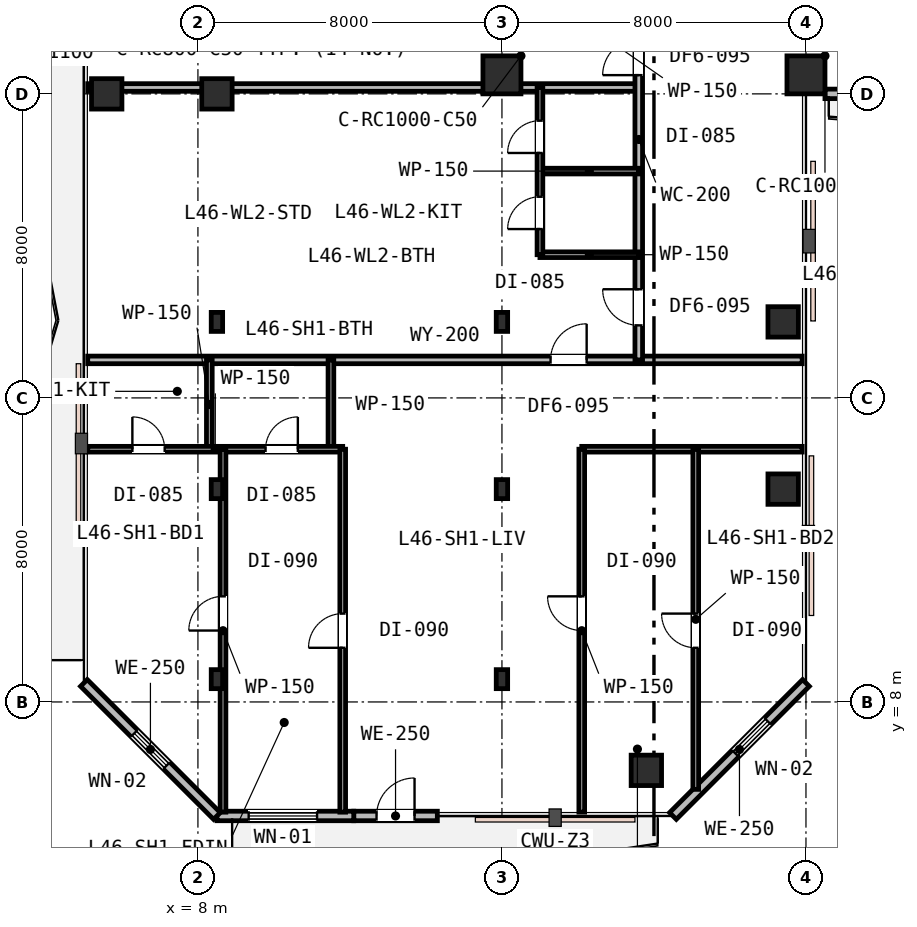
"""IFC4 building model, lengths in metres.
Left out: names, types, materials, properties, quantities, classifications, styles, units other than length and angle.
Written with IfcOpenShell. Run it as: python <this file> out.ifc"""

import sys

from ifc_helpers import new_model, si_unit, direction, frame, frame_2d, origin, origin_2d, place, context, subcontext, project, spatial, rectangle, i_section, extrude, element, fill, save


model = new_model("IFC4")
c1 = context("Model", 3, precision=1e-05, world=origin(), true_north=direction((0.0, 1.0)))
c2 = subcontext(c1, "Body", "Model", "MODEL_VIEW")
j1 = project(units=[si_unit("LENGTHUNIT", "METRE"), si_unit("PLANEANGLEUNIT", "RADIAN")], contexts=[c1])
p1 = place(None, origin())
s1 = spatial("IfcSite", under=j1, at=p1, CompositionType="ELEMENT")
p2 = place(p1, origin())
s2 = spatial("IfcBuilding", under=s1, at=p2, CompositionType="ELEMENT")
p3 = place(p2, frame((0.0, 0.0, 179.4)))
s3 = spatial("IfcBuildingStorey", under=s2, at=p3, CompositionType="ELEMENT", Elevation=179.4)
p4 = place(p3, frame((8.5, 24.0, 0.0), z_axis=(0.0, 0.0, 1.0), x_axis=(1.0, 0.0, 0.0)))
e1 = element("IfcColumn", 1, at=p4, inside=s3, PredefinedType="COLUMN", context=c2, shape_type="SweptSolid", body=[
    extrude(rectangle(XDim=0.8, YDim=0.8, at=origin_2d()), origin(), (0.0, 0.0, 1.0), 3.6),
])
for number, where, z_axis, x_axis in (
    (2, (16.0, 24.5, 0.0), (0.0, 0.0, 1.0), (1.0, 0.0, 0.0)),
    (3, (24.0, 24.5, 0.0), (0.0, 0.0, 1.0), (1.0, 0.0, 0.0)),
):
    element("IfcColumn", number, at=place(p3, frame(where, z_axis=z_axis, x_axis=x_axis)), inside=s3, PredefinedType="COLUMN", context=c2, shape_type="SweptSolid", body=[
        extrude(rectangle(XDim=1.0, YDim=1.0, at=origin_2d()), origin(), (0.0, 0.0, 1.0), 3.6),
    ])
for number, where, z_axis, x_axis in (
    (4, (5.6, 24.0, 0.0), (0.0, 0.0, 1.0), (1.0, 0.0, 0.0)),
    (5, (19.8, 6.2, 0.0), (0.0, 0.0, 1.0), (1.0, 0.0, 0.0)),
    (6, (23.4, 13.6, 0.0), (0.0, 0.0, 1.0), (1.0, 0.0, 0.0)),
    (7, (23.4, 18.0, 0.0), (0.0, 0.0, 1.0), (1.0, 0.0, 0.0)),
):
    element("IfcColumn", number, at=place(p3, frame(where, z_axis=z_axis, x_axis=x_axis)), inside=s3, PredefinedType="COLUMN", context=c2, shape_type="SweptSolid", body=[
        extrude(rectangle(XDim=0.8, YDim=0.8, at=origin_2d()), origin(), (0.0, 0.0, 1.0), 3.6),
    ])
for number, where, z_axis, x_axis in (
    (8, (8.5, 8.6, 0.0), (0.0, 0.0, 1.0), (1.0, 0.0, 0.0)),
    (9, (16.0, 8.6, 0.0), (0.0, 0.0, 1.0), (1.0, 0.0, 0.0)),
    (10, (8.5, 13.6, 0.0), (0.0, 0.0, 1.0), (1.0, 0.0, 0.0)),
    (11, (16.0, 13.6, 0.0), (0.0, 0.0, 1.0), (1.0, 0.0, 0.0)),
    (12, (8.5, 18.0, 0.0), (0.0, 0.0, 1.0), (1.0, 0.0, 0.0)),
    (13, (16.0, 18.0, 0.0), (0.0, 0.0, 1.0), (1.0, 0.0, 0.0)),
):
    element("IfcColumn", number, at=place(p3, frame(where, z_axis=z_axis, x_axis=x_axis)), inside=s3, PredefinedType="COLUMN", context=c2, shape_type="SweptSolid", body=[
        extrude(i_section(OverallWidth=0.3, OverallDepth=0.5, WebThickness=0.015, FlangeThickness=0.028, FilletRadius=0.027, at=origin_2d()), origin(), (0.0, 0.0, 1.0), 3.6),
    ])
p5 = place(p3, frame((12.1, 5.0, 0.0), z_axis=(0.0, 0.0, 1.0), x_axis=(1.0, 0.0, 0.0)))
e14 = element("IfcWall", 14, at=p5, inside=s3, PredefinedType="STANDARD", context=c2, shape_type="SweptSolid", body=[
    extrude(rectangle(XDim=2.2, YDim=0.25, at=frame_2d((1.1, 0.0))), origin(), (0.0, 0.0, 1.0), 3.33),
])
p6 = place(p5, frame((0.6, 0.0, 0.0)))
e15 = element("IfcOpeningElement", 15, at=p6, cuts=e14, PredefinedType="OPENING", context=c2, shape_type="SweptSolid", body=[
    extrude(rectangle(XDim=1.0, YDim=2.15, at=frame_2d((0.5, 1.075))), frame((0.0, 0.135, 0.0), z_axis=(0.0, -1.0, 0.0), x_axis=(1.0, 0.0, 0.0)), (0.0, 0.0, 1.0), 0.27),
])
p7 = place(p3, frame((8.5, 5.0, 0.0), z_axis=(0.0, 0.0, 1.0), x_axis=(1.0, 0.0, 0.0)))
e16 = element("IfcWall", 16, at=p7, inside=s3, PredefinedType="STANDARD", context=c2, shape_type="SweptSolid", body=[
    extrude(rectangle(XDim=3.6, YDim=0.25, at=frame_2d((1.8, 0.0))), origin(), (0.0, 0.0, 1.0), 3.33),
])
p8 = place(p7, frame((0.835, 0.0, 0.75)))
e17 = element("IfcOpeningElement", 17, at=p8, cuts=e16, PredefinedType="OPENING", context=c2, shape_type="SweptSolid", body=[
    extrude(rectangle(XDim=1.8, YDim=1.85, at=frame_2d((0.9, 0.925))), frame((0.0, 0.135, 0.0), z_axis=(0.0, -1.0, 0.0), x_axis=(1.0, 0.0, 0.0)), (0.0, 0.0, 1.0), 0.27),
])
p9 = place(p3, frame((20.5, 5.0, 0.0), z_axis=(0.0, 0.0, 1.0), x_axis=(0.707106781187, 0.707106781187, 0.0)))
e18 = element("IfcWall", 18, at=p9, inside=s3, PredefinedType="STANDARD", context=c2, shape_type="SweptSolid", body=[
    extrude(rectangle(XDim=4.95, YDim=0.25, at=frame_2d((2.475, 0.0))), origin(), (0.0, 0.0, 1.0), 3.33),
])
p10 = place(p9, frame((2.325, 0.0, 0.85)))
e19 = element("IfcOpeningElement", 19, at=p10, cuts=e18, PredefinedType="OPENING", context=c2, shape_type="SweptSolid", body=[
    extrude(rectangle(XDim=1.2, YDim=1.6, at=frame_2d((0.6, 0.8))), frame((0.0, 0.135, 0.0), z_axis=(0.0, -1.0, 0.0), x_axis=(1.0, 0.0, 0.0)), (0.0, 0.0, 1.0), 0.27),
])
p11 = place(p3, frame((24.5, 24.0, 0.0), z_axis=(0.0, 0.0, 1.0), x_axis=(1.0, 0.0, 0.0)))
e20 = element("IfcWall", 20, at=p11, inside=s3, PredefinedType="STANDARD", context=c2, shape_type="SweptSolid", body=[
    extrude(rectangle(XDim=1.35, YDim=0.25, at=frame_2d((0.675, 0.0))), origin(), (0.0, 0.0, 1.0), 3.02),
])
p12 = place(p3, frame((5.0, 8.5, 0.0), z_axis=(0.0, 0.0, 1.0), x_axis=(0.707106781187, -0.707106781187, 0.0)))
e21 = element("IfcWall", 21, at=p12, inside=s3, PredefinedType="STANDARD", context=c2, shape_type="SweptSolid", body=[
    extrude(rectangle(XDim=4.95, YDim=0.25, at=frame_2d((2.475, 0.0))), origin(), (0.0, 0.0, 1.0), 3.33),
])
p13 = place(p12, frame((1.875, 0.0, 0.85)))
e22 = element("IfcOpeningElement", 22, at=p13, cuts=e21, PredefinedType="OPENING", context=c2, shape_type="SweptSolid", body=[
    extrude(rectangle(XDim=1.2, YDim=1.6, at=frame_2d((0.6, 0.8))), frame((0.0, 0.135, 0.0), z_axis=(0.0, -1.0, 0.0), x_axis=(1.0, 0.0, 0.0)), (0.0, 0.0, 1.0), 0.27),
])
p14 = place(p3, frame((5.1, 17.0, 0.0), z_axis=(0.0, 0.0, 1.0), x_axis=(1.0, 0.0, 0.0)))
e23 = element("IfcWall", 23, at=p14, inside=s3, PredefinedType="PARTITIONING", context=c2, shape_type="SweptSolid", body=[
    extrude(rectangle(XDim=18.8, YDim=0.2, at=frame_2d((9.4, 0.0))), origin(), (0.0, 0.0, 1.0), 2.92),
])
p15 = place(p14, frame((12.179, 0.0, 0.0)))
e24 = element("IfcOpeningElement", 24, at=p15, cuts=e23, PredefinedType="OPENING", context=c2, shape_type="SweptSolid", body=[
    extrude(rectangle(XDim=0.95, YDim=2.15, at=frame_2d((0.475, 1.075))), frame((0.0, 0.11, 0.0), z_axis=(0.0, -1.0, 0.0), x_axis=(1.0, 0.0, 0.0)), (0.0, 0.0, 1.0), 0.22),
])
p16 = place(p3, frame((5.1, 24.168, 0.0), z_axis=(0.0, 0.0, 1.0), x_axis=(1.0, 0.0, 0.0)))
e25 = element("IfcWall", 25, at=p16, inside=s3, PredefinedType="PARTITIONING", context=c2, shape_type="SweptSolid", body=[
    extrude(rectangle(XDim=14.5, YDim=0.2, at=frame_2d((7.25, 0.0))), origin(), (0.0, 0.0, 1.0), 2.92),
])
p17 = place(p3, frame((19.6, 17.0, 0.0), z_axis=(0.0, 0.0, 1.0), x_axis=(0.0, 1.0, 0.0)))
e26 = element("IfcWall", 26, at=p17, inside=s3, PredefinedType="PARTITIONING", context=c2, shape_type="SweptSolid", body=[
    extrude(rectangle(XDim=11.6, YDim=0.2, at=frame_2d((5.8, 0.0))), origin(), (0.0, 0.0, 1.0), 2.92),
])
p18 = place(p17, frame((7.493, 0.0, 0.0)))
e27 = element("IfcOpeningElement", 27, at=p18, cuts=e26, PredefinedType="OPENING", context=c2, shape_type="SweptSolid", body=[
    extrude(rectangle(XDim=0.95, YDim=2.15, at=frame_2d((0.475, 1.075))), frame((0.0, 0.11, 0.0), z_axis=(0.0, -1.0, 0.0), x_axis=(1.0, 0.0, 0.0)), (0.0, 0.0, 1.0), 0.22),
])
p19 = place(p17, frame((0.909, 0.0, 0.0)))
e28 = element("IfcOpeningElement", 28, at=p19, cuts=e26, PredefinedType="OPENING", context=c2, shape_type="SweptSolid", body=[
    extrude(rectangle(XDim=0.95, YDim=2.15, at=frame_2d((0.475, 1.075))), frame((0.0, 0.11, 0.0), z_axis=(0.0, -1.0, 0.0), x_axis=(1.0, 0.0, 0.0)), (0.0, 0.0, 1.0), 0.22),
])
for number, where, z_axis, x_axis in (
    (29, (17.0, 19.768, 0.0), (0.0, 0.0, 1.0), (1.0, 0.0, 0.0)),
    (30, (17.0, 21.968, 0.0), (0.0, 0.0, 1.0), (1.0, 0.0, 0.0)),
):
    element("IfcWall", number, at=place(p3, frame(where, z_axis=z_axis, x_axis=x_axis)), inside=s3, PredefinedType="PARTITIONING", context=c2, shape_type="SweptSolid", body=[
        extrude(rectangle(XDim=2.6, YDim=0.15, at=frame_2d((1.3, 0.0))), origin(), (0.0, 0.0, 1.0), 3.33),
    ])
p20 = place(p3, frame((17.0, 19.768, 0.0), z_axis=(0.0, 0.0, 1.0), x_axis=(0.0, 1.0, 0.0)))
e31 = element("IfcWall", 31, at=p20, inside=s3, PredefinedType="PARTITIONING", context=c2, shape_type="SweptSolid", body=[
    extrude(rectangle(XDim=4.4, YDim=0.15, at=frame_2d((2.2, 0.0))), origin(), (0.0, 0.0, 1.0), 2.92),
])
p21 = place(p20, frame((0.675, 0.0, 0.0)))
e32 = element("IfcOpeningElement", 32, at=p21, cuts=e31, PredefinedType="OPENING", context=c2, shape_type="SweptSolid", body=[
    extrude(rectangle(XDim=0.85, YDim=2.15, at=frame_2d((0.425, 1.075))), frame((0.0, 0.085, 0.0), z_axis=(0.0, -1.0, 0.0), x_axis=(1.0, 0.0, 0.0)), (0.0, 0.0, 1.0), 0.17),
])
p22 = place(p20, frame((2.677, 0.0, 0.0)))
e33 = element("IfcOpeningElement", 33, at=p22, cuts=e31, PredefinedType="OPENING", context=c2, shape_type="SweptSolid", body=[
    extrude(rectangle(XDim=0.85, YDim=2.15, at=frame_2d((0.425, 1.075))), frame((0.0, 0.085, 0.0), z_axis=(0.0, -1.0, 0.0), x_axis=(1.0, 0.0, 0.0)), (0.0, 0.0, 1.0), 0.17),
])
p23 = place(p3, frame((11.5, 14.65, 0.0), z_axis=(0.0, 0.0, 1.0), x_axis=(0.0, 1.0, 0.0)))
e34 = element("IfcWall", 34, at=p23, inside=s3, PredefinedType="PARTITIONING", context=c2, shape_type="SweptSolid", body=[
    extrude(rectangle(XDim=2.35, YDim=0.15, at=frame_2d((1.175, 0.0))), origin(), (0.0, 0.0, 1.0), 3.07),
])
p24 = place(p3, frame((8.3, 14.65, 0.0), z_axis=(0.0, 0.0, 1.0), x_axis=(0.0, 1.0, 0.0)))
e35 = element("IfcWall", 35, at=p24, inside=s3, PredefinedType="PARTITIONING", context=c2, shape_type="SweptSolid", body=[
    extrude(rectangle(XDim=2.35, YDim=0.15, at=frame_2d((1.175, 0.0))), origin(), (0.0, 0.0, 1.0), 2.92),
])
p25 = place(p3, frame((5.1, 14.65, 0.0), z_axis=(0.0, 0.0, 1.0), x_axis=(1.0, 0.0, 0.0)))
e36 = element("IfcWall", 36, at=p25, inside=s3, PredefinedType="PARTITIONING", context=c2, shape_type="SweptSolid", body=[
    extrude(rectangle(XDim=6.71, YDim=0.15, at=frame_2d((3.355, 0.0))), origin(), (0.0, 0.0, 1.0), 2.92),
])
p26 = place(p25, frame((1.175, 0.0, 0.0)))
e37 = element("IfcOpeningElement", 37, at=p26, cuts=e36, PredefinedType="OPENING", context=c2, shape_type="SweptSolid", body=[
    extrude(rectangle(XDim=0.85, YDim=2.15, at=frame_2d((0.425, 1.075))), frame((0.0, 0.085, 0.0), z_axis=(0.0, -1.0, 0.0), x_axis=(1.0, 0.0, 0.0)), (0.0, 0.0, 1.0), 0.17),
])
p27 = place(p25, frame((4.679, 0.0, 0.0)))
e38 = element("IfcOpeningElement", 38, at=p27, cuts=e36, PredefinedType="OPENING", context=c2, shape_type="SweptSolid", body=[
    extrude(rectangle(XDim=0.85, YDim=2.15, at=frame_2d((0.425, 1.075))), frame((0.0, 0.085, 0.0), z_axis=(0.0, -1.0, 0.0), x_axis=(1.0, 0.0, 0.0)), (0.0, 0.0, 1.0), 0.17),
])
p28 = place(p3, frame((18.1, 14.65, 0.0), z_axis=(0.0, 0.0, 1.0), x_axis=(1.0, 0.0, 0.0)))
e39 = element("IfcWall", 39, at=p28, inside=s3, PredefinedType="PARTITIONING", context=c2, shape_type="SweptSolid", body=[
    extrude(rectangle(XDim=5.8, YDim=0.15, at=frame_2d((2.9, 0.0))), origin(), (0.0, 0.0, 1.0), 3.02),
])
p29 = place(p3, frame((8.66, 5.1, 0.0), z_axis=(0.0, 0.0, 1.0), x_axis=(0.0, 1.0, 0.0)))
e40 = element("IfcWall", 40, at=p29, inside=s3, PredefinedType="PARTITIONING", context=c2, shape_type="SweptSolid", body=[
    extrude(rectangle(XDim=9.55, YDim=0.15, at=frame_2d((4.775, 0.0))), origin(), (0.0, 0.0, 1.0), 2.92),
])
p30 = place(p29, frame((4.779, 0.0, 0.0)))
e41 = element("IfcOpeningElement", 41, at=p30, cuts=e40, PredefinedType="OPENING", context=c2, shape_type="SweptSolid", body=[
    extrude(rectangle(XDim=0.9, YDim=2.15, at=frame_2d((0.45, 1.075))), frame((0.0, 0.085, 0.0), z_axis=(0.0, -1.0, 0.0), x_axis=(1.0, 0.0, 0.0)), (0.0, 0.0, 1.0), 0.17),
])
p31 = place(p3, frame((21.1, 5.7, 0.0), z_axis=(0.0, 0.0, 1.0), x_axis=(0.0, 1.0, 0.0)))
e42 = element("IfcWall", 42, at=p31, inside=s3, PredefinedType="PARTITIONING", context=c2, shape_type="SweptSolid", body=[
    extrude(rectangle(XDim=8.95, YDim=0.15, at=frame_2d((4.475, 0.0))), origin(), (0.0, 0.0, 1.0), 2.92),
])
p32 = place(p31, frame((3.725, 0.0, 0.0)))
e43 = element("IfcOpeningElement", 43, at=p32, cuts=e42, PredefinedType="OPENING", context=c2, shape_type="SweptSolid", body=[
    extrude(rectangle(XDim=0.9, YDim=2.15, at=frame_2d((0.45, 1.075))), frame((0.0, 0.085, 0.0), z_axis=(0.0, -1.0, 0.0), x_axis=(1.0, 0.0, 0.0)), (0.0, 0.0, 1.0), 0.17),
])
p33 = place(p3, frame((18.1, 5.1, 0.0), z_axis=(0.0, 0.0, 1.0), x_axis=(0.0, 1.0, 0.0)))
e44 = element("IfcWall", 44, at=p33, inside=s3, PredefinedType="PARTITIONING", context=c2, shape_type="SweptSolid", body=[
    extrude(rectangle(XDim=9.55, YDim=0.15, at=frame_2d((4.775, 0.0))), origin(), (0.0, 0.0, 1.0), 2.92),
])
p34 = place(p33, frame((4.779, 0.0, 0.0)))
e45 = element("IfcOpeningElement", 45, at=p34, cuts=e44, PredefinedType="OPENING", context=c2, shape_type="SweptSolid", body=[
    extrude(rectangle(XDim=0.9, YDim=2.15, at=frame_2d((0.45, 1.075))), frame((0.0, 0.085, 0.0), z_axis=(0.0, -1.0, 0.0), x_axis=(1.0, 0.0, 0.0)), (0.0, 0.0, 1.0), 0.17),
])
p35 = place(p3, frame((11.81, 5.1, 0.0), z_axis=(0.0, 0.0, 1.0), x_axis=(0.0, 1.0, 0.0)))
e46 = element("IfcWall", 46, at=p35, inside=s3, PredefinedType="PARTITIONING", context=c2, shape_type="SweptSolid", body=[
    extrude(rectangle(XDim=9.55, YDim=0.15, at=frame_2d((4.775, 0.0))), origin(), (0.0, 0.0, 1.0), 2.92),
])
p36 = place(p35, frame((4.325, 0.0, 0.0)))
e47 = element("IfcOpeningElement", 47, at=p36, cuts=e46, PredefinedType="OPENING", context=c2, shape_type="SweptSolid", body=[
    extrude(rectangle(XDim=0.9, YDim=2.15, at=frame_2d((0.45, 1.075))), frame((0.0, 0.085, 0.0), z_axis=(0.0, -1.0, 0.0), x_axis=(1.0, 0.0, 0.0)), (0.0, 0.0, 1.0), 0.17),
])
p37 = place(p6, origin())
e48 = element("IfcDoor", 48, at=p37, inside=s3, OperationType="SINGLE_SWING_RIGHT", PredefinedType="DOOR", context=c2, shape_type="SweptSolid", body=[
    extrude(rectangle(XDim=1.0, YDim=2.15, at=frame_2d((0.5, 1.075))), frame((0.0, 0.025, 0.0), z_axis=(0.0, -1.0, 0.0), x_axis=(1.0, 0.0, 0.0)), (0.0, 0.0, 1.0), 0.05),
])
fill(e15, e48)
p38 = place(p8, origin())
e49 = element("IfcWindow", 49, at=p38, inside=s3, PartitioningType="SINGLE_PANEL", PredefinedType="WINDOW", context=c2, shape_type="SweptSolid", body=[
    extrude(rectangle(XDim=1.8, YDim=1.85, at=frame_2d((0.9, 0.925))), frame((0.0, 0.03, 0.0), z_axis=(0.0, -1.0, 0.0), x_axis=(1.0, 0.0, 0.0)), (0.0, 0.0, 1.0), 0.06),
])
fill(e17, e49)
p39 = place(p10, origin())
e50 = element("IfcWindow", 50, at=p39, inside=s3, PartitioningType="SINGLE_PANEL", PredefinedType="WINDOW", context=c2, shape_type="SweptSolid", body=[
    extrude(rectangle(XDim=1.2, YDim=1.6, at=frame_2d((0.6, 0.8))), frame((0.0, 0.03, 0.0), z_axis=(0.0, -1.0, 0.0), x_axis=(1.0, 0.0, 0.0)), (0.0, 0.0, 1.0), 0.06),
])
fill(e19, e50)
p40 = place(p13, origin())
e51 = element("IfcWindow", 51, at=p40, inside=s3, PartitioningType="SINGLE_PANEL", PredefinedType="WINDOW", context=c2, shape_type="SweptSolid", body=[
    extrude(rectangle(XDim=1.2, YDim=1.6, at=frame_2d((0.6, 0.8))), frame((0.0, 0.03, 0.0), z_axis=(0.0, -1.0, 0.0), x_axis=(1.0, 0.0, 0.0)), (0.0, 0.0, 1.0), 0.06),
])
fill(e22, e51)
p41 = place(p18, origin())
e52 = element("IfcDoor", 52, at=p41, inside=s3, OperationType="SINGLE_SWING_LEFT", PredefinedType="DOOR", context=c2, shape_type="SweptSolid", body=[
    extrude(rectangle(XDim=0.95, YDim=2.15, at=frame_2d((0.475, 1.075))), frame((0.0, 0.025, 0.0), z_axis=(0.0, -1.0, 0.0), x_axis=(1.0, 0.0, 0.0)), (0.0, 0.0, 1.0), 0.05),
])
fill(e27, e52)
p42 = place(p19, origin())
e53 = element("IfcDoor", 53, at=p42, inside=s3, OperationType="SINGLE_SWING_RIGHT", PredefinedType="DOOR", context=c2, shape_type="SweptSolid", body=[
    extrude(rectangle(XDim=0.95, YDim=2.15, at=frame_2d((0.475, 1.075))), frame((0.0, 0.025, 0.0), z_axis=(0.0, -1.0, 0.0), x_axis=(1.0, 0.0, 0.0)), (0.0, 0.0, 1.0), 0.05),
])
fill(e28, e53)
p43 = place(p21, origin())
e54 = element("IfcDoor", 54, at=p43, inside=s3, OperationType="SINGLE_SWING_LEFT", PredefinedType="DOOR", context=c2, shape_type="SweptSolid", body=[
    extrude(rectangle(XDim=0.85, YDim=2.15, at=frame_2d((0.425, 1.075))), frame((0.0, 0.025, 0.0), z_axis=(0.0, -1.0, 0.0), x_axis=(1.0, 0.0, 0.0)), (0.0, 0.0, 1.0), 0.05),
])
fill(e32, e54)
p44 = place(p22, origin())
e55 = element("IfcDoor", 55, at=p44, inside=s3, OperationType="SINGLE_SWING_LEFT", PredefinedType="DOOR", context=c2, shape_type="SweptSolid", body=[
    extrude(rectangle(XDim=0.85, YDim=2.15, at=frame_2d((0.425, 1.075))), frame((0.0, 0.025, 0.0), z_axis=(0.0, -1.0, 0.0), x_axis=(1.0, 0.0, 0.0)), (0.0, 0.0, 1.0), 0.05),
])
fill(e33, e55)
p45 = place(p15, origin())
e56 = element("IfcDoor", 56, at=p45, inside=s3, OperationType="SINGLE_SWING_RIGHT", PredefinedType="DOOR", context=c2, shape_type="SweptSolid", body=[
    extrude(rectangle(XDim=0.95, YDim=2.15, at=frame_2d((0.475, 1.075))), frame((0.0, 0.025, 0.0), z_axis=(0.0, -1.0, 0.0), x_axis=(1.0, 0.0, 0.0)), (0.0, 0.0, 1.0), 0.05),
])
fill(e24, e56)
p46 = place(p26, origin())
e57 = element("IfcDoor", 57, at=p46, inside=s3, OperationType="SINGLE_SWING_LEFT", PredefinedType="DOOR", context=c2, shape_type="SweptSolid", body=[
    extrude(rectangle(XDim=0.85, YDim=2.15, at=frame_2d((0.425, 1.075))), frame((0.0, 0.025, 0.0), z_axis=(0.0, -1.0, 0.0), x_axis=(1.0, 0.0, 0.0)), (0.0, 0.0, 1.0), 0.05),
])
fill(e37, e57)
p47 = place(p27, origin())
e58 = element("IfcDoor", 58, at=p47, inside=s3, OperationType="SINGLE_SWING_RIGHT", PredefinedType="DOOR", context=c2, shape_type="SweptSolid", body=[
    extrude(rectangle(XDim=0.85, YDim=2.15, at=frame_2d((0.425, 1.075))), frame((0.0, 0.025, 0.0), z_axis=(0.0, -1.0, 0.0), x_axis=(1.0, 0.0, 0.0)), (0.0, 0.0, 1.0), 0.05),
])
fill(e38, e58)
p48 = place(p30, origin())
e59 = element("IfcDoor", 59, at=p48, inside=s3, OperationType="SINGLE_SWING_LEFT", PredefinedType="DOOR", context=c2, shape_type="SweptSolid", body=[
    extrude(rectangle(XDim=0.9, YDim=2.15, at=frame_2d((0.45, 1.075))), frame((0.0, 0.025, 0.0), z_axis=(0.0, -1.0, 0.0), x_axis=(1.0, 0.0, 0.0)), (0.0, 0.0, 1.0), 0.05),
])
fill(e41, e59)
p49 = place(p32, origin())
e60 = element("IfcDoor", 60, at=p49, inside=s3, OperationType="SINGLE_SWING_RIGHT", PredefinedType="DOOR", context=c2, shape_type="SweptSolid", body=[
    extrude(rectangle(XDim=0.9, YDim=2.15, at=frame_2d((0.45, 1.075))), frame((0.0, 0.025, 0.0), z_axis=(0.0, -1.0, 0.0), x_axis=(1.0, 0.0, 0.0)), (0.0, 0.0, 1.0), 0.05),
])
fill(e43, e60)
p50 = place(p34, origin())
e61 = element("IfcDoor", 61, at=p50, inside=s3, OperationType="SINGLE_SWING_RIGHT", PredefinedType="DOOR", context=c2, shape_type="SweptSolid", body=[
    extrude(rectangle(XDim=0.9, YDim=2.15, at=frame_2d((0.45, 1.075))), frame((0.0, 0.025, 0.0), z_axis=(0.0, -1.0, 0.0), x_axis=(1.0, 0.0, 0.0)), (0.0, 0.0, 1.0), 0.05),
])
fill(e45, e61)
p51 = place(p36, origin())
e62 = element("IfcDoor", 62, at=p51, inside=s3, OperationType="SINGLE_SWING_LEFT", PredefinedType="DOOR", context=c2, shape_type="SweptSolid", body=[
    extrude(rectangle(XDim=0.9, YDim=2.15, at=frame_2d((0.45, 1.075))), frame((0.0, 0.025, 0.0), z_axis=(0.0, -1.0, 0.0), x_axis=(1.0, 0.0, 0.0)), (0.0, 0.0, 1.0), 0.05),
])
fill(e47, e62)
save(model, sys.argv[1])
